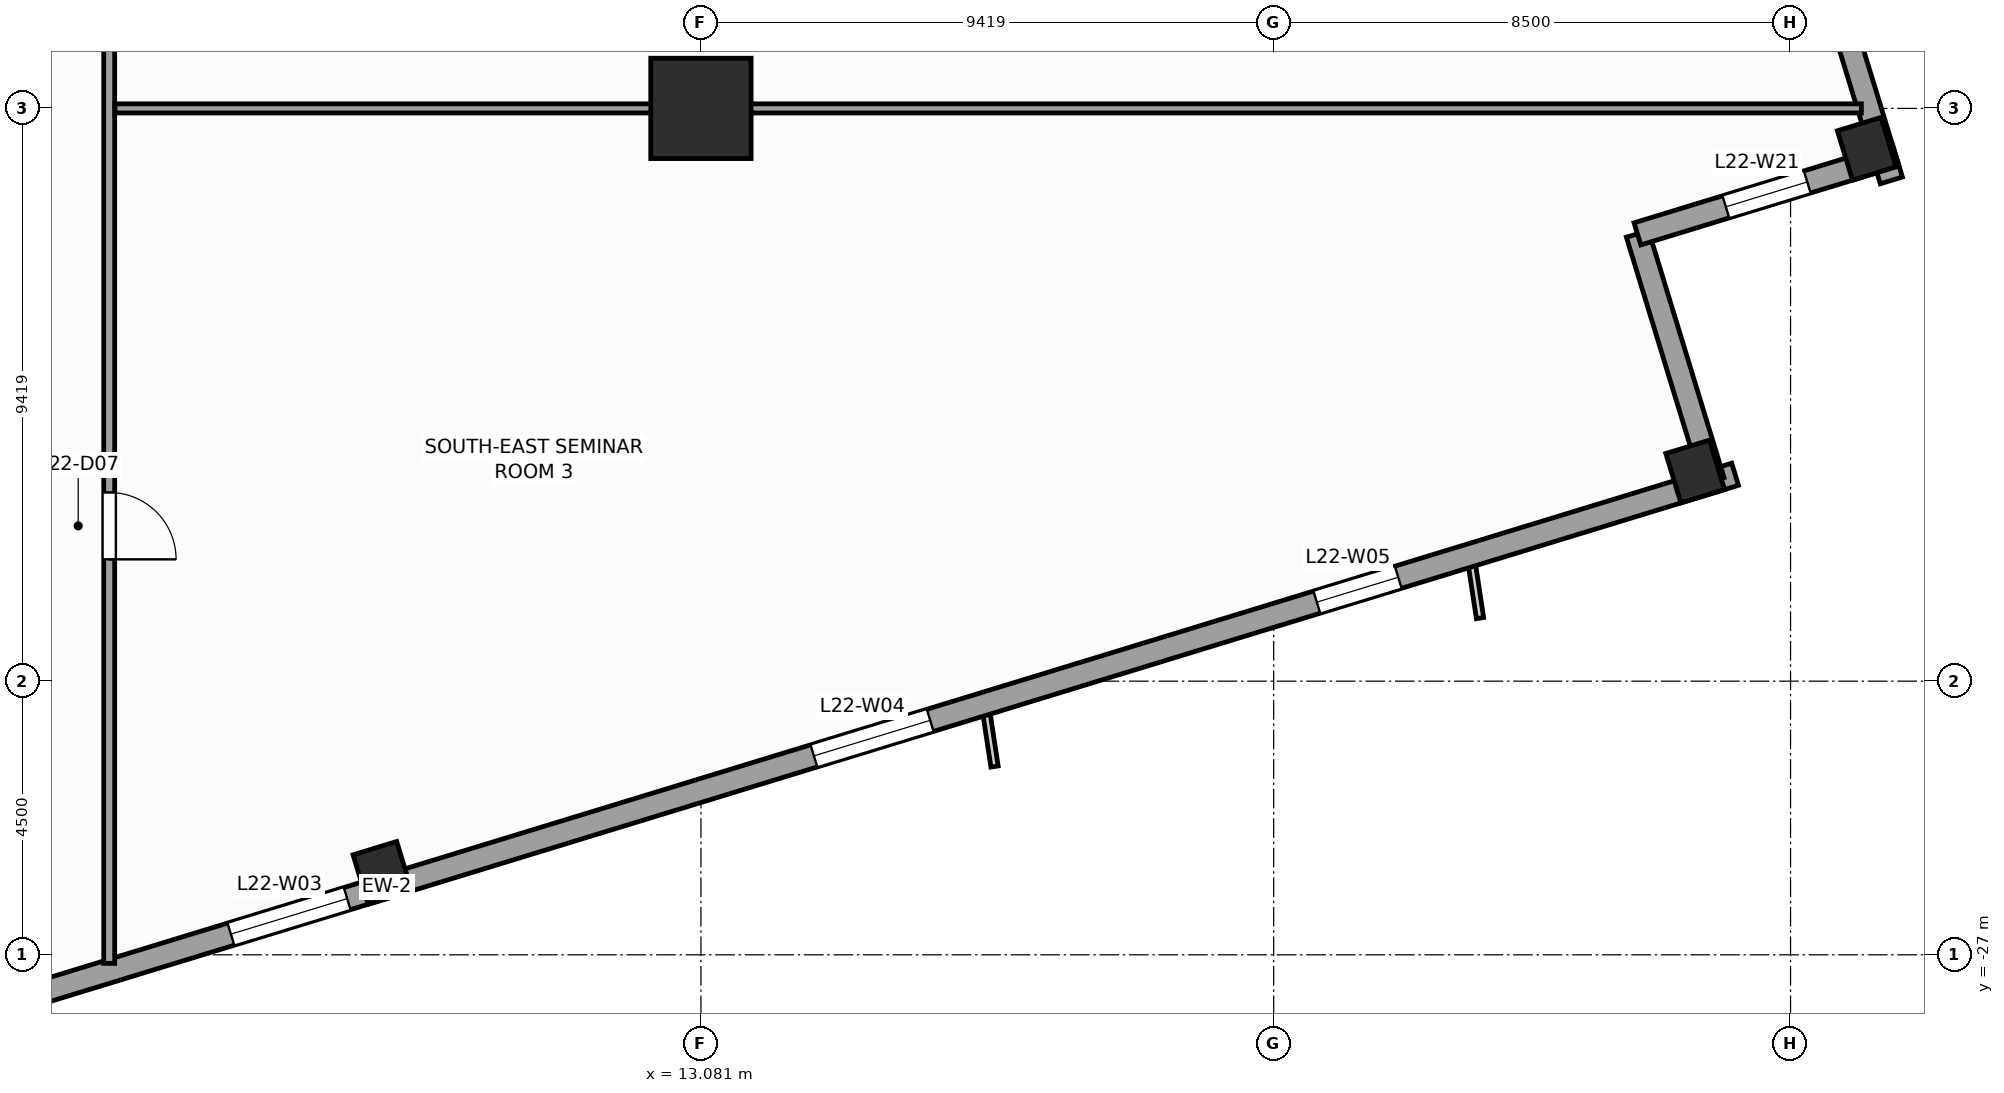
"""IFC4 building model, lengths in metres.
Left out: names, types, materials, properties, quantities, classifications, styles, units other than length and angle.
Written with IfcOpenShell. Run it as: python <this file> out.ifc"""

import sys

from ifc_helpers import new_model, si_unit, direction, frame, frame_2d, origin, origin_2d, place, context, subcontext, project, spatial, rectangle, extrude, source, transform, mapped, element, fill, save


model = new_model("IFC4")
c1 = context("Model", 3, precision=1e-05, world=origin(), true_north=direction((0.0, 1.0)))
c2 = subcontext(c1, "Body", "Model", "MODEL_VIEW")
j1 = project(units=[si_unit("LENGTHUNIT", "METRE"), si_unit("PLANEANGLEUNIT", "RADIAN")], contexts=[c1])
p1 = place(None, origin())
s1 = spatial("IfcSite", under=j1, at=p1, CompositionType="ELEMENT")
p2 = place(p1, origin())
s2 = spatial("IfcBuilding", under=s1, at=p2, CompositionType="ELEMENT")
p3 = place(p2, frame((0.0, 0.0, 95.2)))
s3 = spatial("IfcBuildingStorey", under=s2, at=p3, CompositionType="ELEMENT", Elevation=95.2)
m1 = source(origin(), c2, "Body", "SweptSolid", [
    extrude(rectangle(XDim=1.65, YDim=1.65, at=origin_2d()), origin(), (0.0, 0.0, 1.0), 4.0),
])
p4 = place(p3, frame((13.081, -13.081, 0.0), z_axis=(0.0, 0.0, 1.0), x_axis=(1.0, 0.0, 0.0)))
e1 = element("IfcColumn", 1, at=p4, inside=s3, PredefinedType="COLUMN", context=c2, shape_type="MappedRepresentation", body=[
    mapped(m1, transform((0.0, 0.0, 0.0), scale=1.0)),
])
m2 = source(origin(), c2, "Body", "SweptSolid", [
    extrude(rectangle(XDim=0.75, YDim=0.85, at=origin_2d()), origin(), (0.0, 0.0, 1.0), 4.0),
])
for number, where, z_axis, x_axis in (
    (2, (7.843, -25.653, 0.0), (0.0, 0.0, 1.0), (0.956, 0.292, 0.0)),
    (3, (29.431, -19.052, 0.0), (0.0, 0.0, 1.0), (0.956, 0.292, 0.0)),
    (4, (32.253, -13.746, 0.0), (0.0, 0.0, 1.0), (0.956, 0.292, 0.0)),
):
    element("IfcColumn", number, at=place(p3, frame(where, z_axis=z_axis, x_axis=x_axis)), inside=s3, PredefinedType="COLUMN", context=c2, shape_type="MappedRepresentation", body=[
        mapped(m2, transform((0.0, 0.0, 0.0), scale=1.0)),
    ])
p5 = place(p3, frame((-14.265, -32.658, 0.0), z_axis=(0.0, 0.0, 1.0), x_axis=(0.956304320851, 0.292373127906, 0.0)))
e5 = element("IfcWall", 5, at=p5, inside=s3, PredefinedType="STANDARD", context=c2, shape_type="SweptSolid", body=[
    extrude(rectangle(XDim=46.38, YDim=0.38, at=frame_2d((23.19, 0.0))), origin(), (0.0, 0.0, 1.0), 3.14),
])
p6 = place(p5, frame((4.865, 0.0, 0.51)))
e6 = element("IfcOpeningElement", 6, at=p6, cuts=e5, PredefinedType="OPENING", context=c2, shape_type="SweptSolid", body=[
    extrude(rectangle(XDim=1.4, YDim=2.4, at=frame_2d((0.7, 1.2))), frame((0.0, 0.2, 0.0), z_axis=(0.0, -1.0, 0.0), x_axis=(1.0, 0.0, 0.0)), (0.0, 0.0, 1.0), 0.4),
])
p7 = place(p5, frame((12.45, 0.0, 0.51)))
e7 = element("IfcOpeningElement", 7, at=p7, cuts=e5, PredefinedType="OPENING", context=c2, shape_type="SweptSolid", body=[
    extrude(rectangle(XDim=2.0, YDim=2.4, at=frame_2d((1.0, 1.2))), frame((0.0, 0.2, 0.0), z_axis=(0.0, -1.0, 0.0), x_axis=(1.0, 0.0, 0.0)), (0.0, 0.0, 1.0), 0.4),
])
p8 = place(p5, frame((20.512, 0.0, 0.51)))
e8 = element("IfcOpeningElement", 8, at=p8, cuts=e5, PredefinedType="OPENING", context=c2, shape_type="SweptSolid", body=[
    extrude(rectangle(XDim=2.0, YDim=2.4, at=frame_2d((1.0, 1.2))), frame((0.0, 0.2, 0.0), z_axis=(0.0, -1.0, 0.0), x_axis=(1.0, 0.0, 0.0)), (0.0, 0.0, 1.0), 0.4),
])
p9 = place(p5, frame((30.538, 0.0, 0.51)))
e9 = element("IfcOpeningElement", 9, at=p9, cuts=e5, PredefinedType="OPENING", context=c2, shape_type="SweptSolid", body=[
    extrude(rectangle(XDim=2.0, YDim=2.4, at=frame_2d((1.0, 1.2))), frame((0.0, 0.2, 0.0), z_axis=(0.0, -1.0, 0.0), x_axis=(1.0, 0.0, 0.0)), (0.0, 0.0, 1.0), 0.4),
])
p10 = place(p5, frame((39.187, 0.0, 0.51)))
e10 = element("IfcOpeningElement", 10, at=p10, cuts=e5, PredefinedType="OPENING", context=c2, shape_type="SweptSolid", body=[
    extrude(rectangle(XDim=1.4, YDim=2.4, at=frame_2d((0.7, 1.2))), frame((0.0, 0.2, 0.0), z_axis=(0.0, -1.0, 0.0), x_axis=(1.0, 0.0, 0.0)), (0.0, 0.0, 1.0), 0.4),
])
p11 = place(p3, frame((29.725, -19.208, 0.0), z_axis=(0.0, 0.0, 1.0), x_axis=(-0.292345507338, 0.956312764915, 0.0)))
e11 = element("IfcWall", 11, at=p11, inside=s3, PredefinedType="STANDARD", context=c2, shape_type="SweptSolid", body=[
    extrude(rectangle(XDim=4.25, YDim=0.38, at=frame_2d((2.125, 0.0))), origin(), (0.0, 0.0, 1.0), 3.74),
])
p12 = place(p3, frame((28.482, -15.144, 0.0), z_axis=(0.0, 0.0, 1.0), x_axis=(0.956304176051, 0.292373601522, 0.0)))
e12 = element("IfcWall", 12, at=p12, inside=s3, PredefinedType="STANDARD", context=c2, shape_type="SweptSolid", body=[
    extrude(rectangle(XDim=4.44, YDim=0.38, at=frame_2d((2.22, 0.0))), origin(), (0.0, 0.0, 1.0), 3.04),
])
p13 = place(p12, frame((1.52, 0.0, 0.51)))
e13 = element("IfcOpeningElement", 13, at=p13, cuts=e12, PredefinedType="OPENING", context=c2, shape_type="SweptSolid", body=[
    extrude(rectangle(XDim=1.4, YDim=2.4, at=frame_2d((0.7, 1.2))), frame((0.0, 0.2, 0.0), z_axis=(0.0, -1.0, 0.0), x_axis=(1.0, 0.0, 0.0)), (0.0, 0.0, 1.0), 0.4),
])
p14 = place(p3, frame((32.658, -14.265, 0.0), z_axis=(0.0, 0.0, 1.0), x_axis=(-0.292373127906, 0.956304320851, 0.0)))
e14 = element("IfcWall", 14, at=p14, inside=s3, PredefinedType="STANDARD", context=c2, shape_type="SweptSolid", body=[
    extrude(rectangle(XDim=46.38, YDim=0.38, at=frame_2d((23.19, 0.0))), origin(), (0.0, 0.0, 1.0), 3.14),
])
p15 = place(p14, frame((28.265, 0.0, 0.0)))
e15 = element("IfcOpeningElement", 15, at=p15, cuts=e14, PredefinedType="OPENING", context=c2, shape_type="SweptSolid", body=[
    extrude(rectangle(XDim=1.05, YDim=2.25, at=frame_2d((0.525, 1.125))), frame((0.0, 0.2, 0.0), z_axis=(0.0, -1.0, 0.0), x_axis=(1.0, 0.0, 0.0)), (0.0, 0.0, 1.0), 0.4),
])
p16 = place(p14, frame((4.865, 0.0, 0.51)))
e16 = element("IfcOpeningElement", 16, at=p16, cuts=e14, PredefinedType="OPENING", context=c2, shape_type="SweptSolid", body=[
    extrude(rectangle(XDim=1.4, YDim=2.4, at=frame_2d((0.7, 1.2))), frame((0.0, 0.2, 0.0), z_axis=(0.0, -1.0, 0.0), x_axis=(1.0, 0.0, 0.0)), (0.0, 0.0, 1.0), 0.4),
])
p17 = place(p14, frame((10.95, 0.0, 0.51)))
e17 = element("IfcOpeningElement", 17, at=p17, cuts=e14, PredefinedType="OPENING", context=c2, shape_type="SweptSolid", body=[
    extrude(rectangle(XDim=2.0, YDim=2.4, at=frame_2d((1.0, 1.2))), frame((0.0, 0.2, 0.0), z_axis=(0.0, -1.0, 0.0), x_axis=(1.0, 0.0, 0.0)), (0.0, 0.0, 1.0), 0.4),
])
p18 = place(p14, frame((20.512, 0.0, 0.51)))
e18 = element("IfcOpeningElement", 18, at=p18, cuts=e14, PredefinedType="OPENING", context=c2, shape_type="SweptSolid", body=[
    extrude(rectangle(XDim=2.0, YDim=2.4, at=frame_2d((1.0, 1.2))), frame((0.0, 0.2, 0.0), z_axis=(0.0, -1.0, 0.0), x_axis=(1.0, 0.0, 0.0)), (0.0, 0.0, 1.0), 0.4),
])
p19 = place(p14, frame((30.538, 0.0, 0.51)))
e19 = element("IfcOpeningElement", 19, at=p19, cuts=e14, PredefinedType="OPENING", context=c2, shape_type="SweptSolid", body=[
    extrude(rectangle(XDim=2.0, YDim=2.4, at=frame_2d((1.0, 1.2))), frame((0.0, 0.2, 0.0), z_axis=(0.0, -1.0, 0.0), x_axis=(1.0, 0.0, 0.0)), (0.0, 0.0, 1.0), 0.4),
])
p20 = place(p14, frame((39.187, 0.0, 0.51)))
e20 = element("IfcOpeningElement", 20, at=p20, cuts=e14, PredefinedType="OPENING", context=c2, shape_type="SweptSolid", body=[
    extrude(rectangle(XDim=1.4, YDim=2.4, at=frame_2d((0.7, 1.2))), frame((0.0, 0.2, 0.0), z_axis=(0.0, -1.0, 0.0), x_axis=(1.0, 0.0, 0.0)), (0.0, 0.0, 1.0), 0.4),
])
p21 = place(p3, frame((3.35, -27.142, 0.0), z_axis=(0.0, 0.0, 1.0), x_axis=(0.0, 1.0, 0.0)))
e21 = element("IfcWall", 21, at=p21, inside=s3, PredefinedType="PARTITIONING", context=c2, shape_type="SweptSolid", body=[
    extrude(rectangle(XDim=16.592, YDim=0.18, at=frame_2d((8.296, 0.0))), origin(), (0.0, 0.0, 1.0), 3.74),
])
p22 = place(p21, frame((6.645, 0.0, 0.0)))
e22 = element("IfcOpeningElement", 22, at=p22, cuts=e21, PredefinedType="OPENING", context=c2, shape_type="SweptSolid", body=[
    extrude(rectangle(XDim=1.1, YDim=2.2, at=frame_2d((0.55, 1.1))), frame((0.0, 0.1, 0.0), z_axis=(0.0, -1.0, 0.0), x_axis=(1.0, 0.0, 0.0)), (0.0, 0.0, 1.0), 0.2),
])
p23 = place(p3, frame((3.445, -13.081, 0.0), z_axis=(0.0, 0.0, 1.0), x_axis=(1.0, 0.0, 0.0)))
e23 = element("IfcWall", 23, at=p23, inside=s3, PredefinedType="PARTITIONING", context=c2, shape_type="SweptSolid", body=[
    extrude(rectangle(XDim=28.72, YDim=0.15, at=frame_2d((14.36, 0.0))), origin(), (0.0, 0.0, 1.0), 2.732),
])
m3 = source(origin(), c2, "Body", "SweptSolid", [
    extrude(rectangle(XDim=2.0, YDim=2.4, at=frame_2d((1.0, 1.2))), frame((0.0, 0.03, 0.0), z_axis=(0.0, -1.0, 0.0), x_axis=(1.0, 0.0, 0.0)), (0.0, 0.0, 1.0), 0.06),
])
p24 = place(p8, origin())
e24 = element("IfcWindow", 24, at=p24, inside=s3, PartitioningType="SINGLE_PANEL", PredefinedType="WINDOW", context=c2, shape_type="MappedRepresentation", body=[
    mapped(m3, transform((0.0, 0.0, 0.0), scale=1.0)),
])
fill(e8, e24)
p25 = place(p9, origin())
e25 = element("IfcWindow", 25, at=p25, inside=s3, PartitioningType="SINGLE_PANEL", PredefinedType="WINDOW", context=c2, shape_type="MappedRepresentation", body=[
    mapped(m3, transform((0.0, 0.0, 0.0), scale=1.0)),
])
fill(e9, e25)
m4 = source(origin(), c2, "Body", "SweptSolid", [
    extrude(rectangle(XDim=1.4, YDim=2.4, at=frame_2d((0.7, 1.2))), frame((0.0, 0.03, 0.0), z_axis=(0.0, -1.0, 0.0), x_axis=(1.0, 0.0, 0.0)), (0.0, 0.0, 1.0), 0.06),
])
p26 = place(p10, origin())
e26 = element("IfcWindow", 26, at=p26, inside=s3, PartitioningType="SINGLE_PANEL", PredefinedType="WINDOW", context=c2, shape_type="MappedRepresentation", body=[
    mapped(m4, transform((0.0, 0.0, 0.0), scale=1.0)),
])
fill(e10, e26)
p27 = place(p13, origin())
e27 = element("IfcWindow", 27, at=p27, inside=s3, PartitioningType="SINGLE_PANEL", PredefinedType="WINDOW", context=c2, shape_type="MappedRepresentation", body=[
    mapped(m4, transform((0.0, 0.0, 0.0), scale=1.0)),
])
fill(e13, e27)
m5 = source(origin(), c2, "Body", "SweptSolid", [
    extrude(rectangle(XDim=1.1, YDim=2.2, at=frame_2d((0.55, 1.1))), frame((0.0, 0.025, 0.0), z_axis=(0.0, -1.0, 0.0), x_axis=(1.0, 0.0, 0.0)), (0.0, 0.0, 1.0), 0.05),
])
p28 = place(p22, frame((1.1, 0.0, 0.0), z_axis=(0.0, 0.0, 1.0), x_axis=(-1.0, 0.0, 0.0)))
e28 = element("IfcDoor", 28, at=p28, inside=s3, OperationType="SINGLE_SWING_LEFT", PredefinedType="DOOR", context=c2, shape_type="MappedRepresentation", body=[
    mapped(m5, transform((0.0, 0.0, 0.0), scale=1.0)),
])
fill(e22, e28)
save(model, sys.argv[1])
